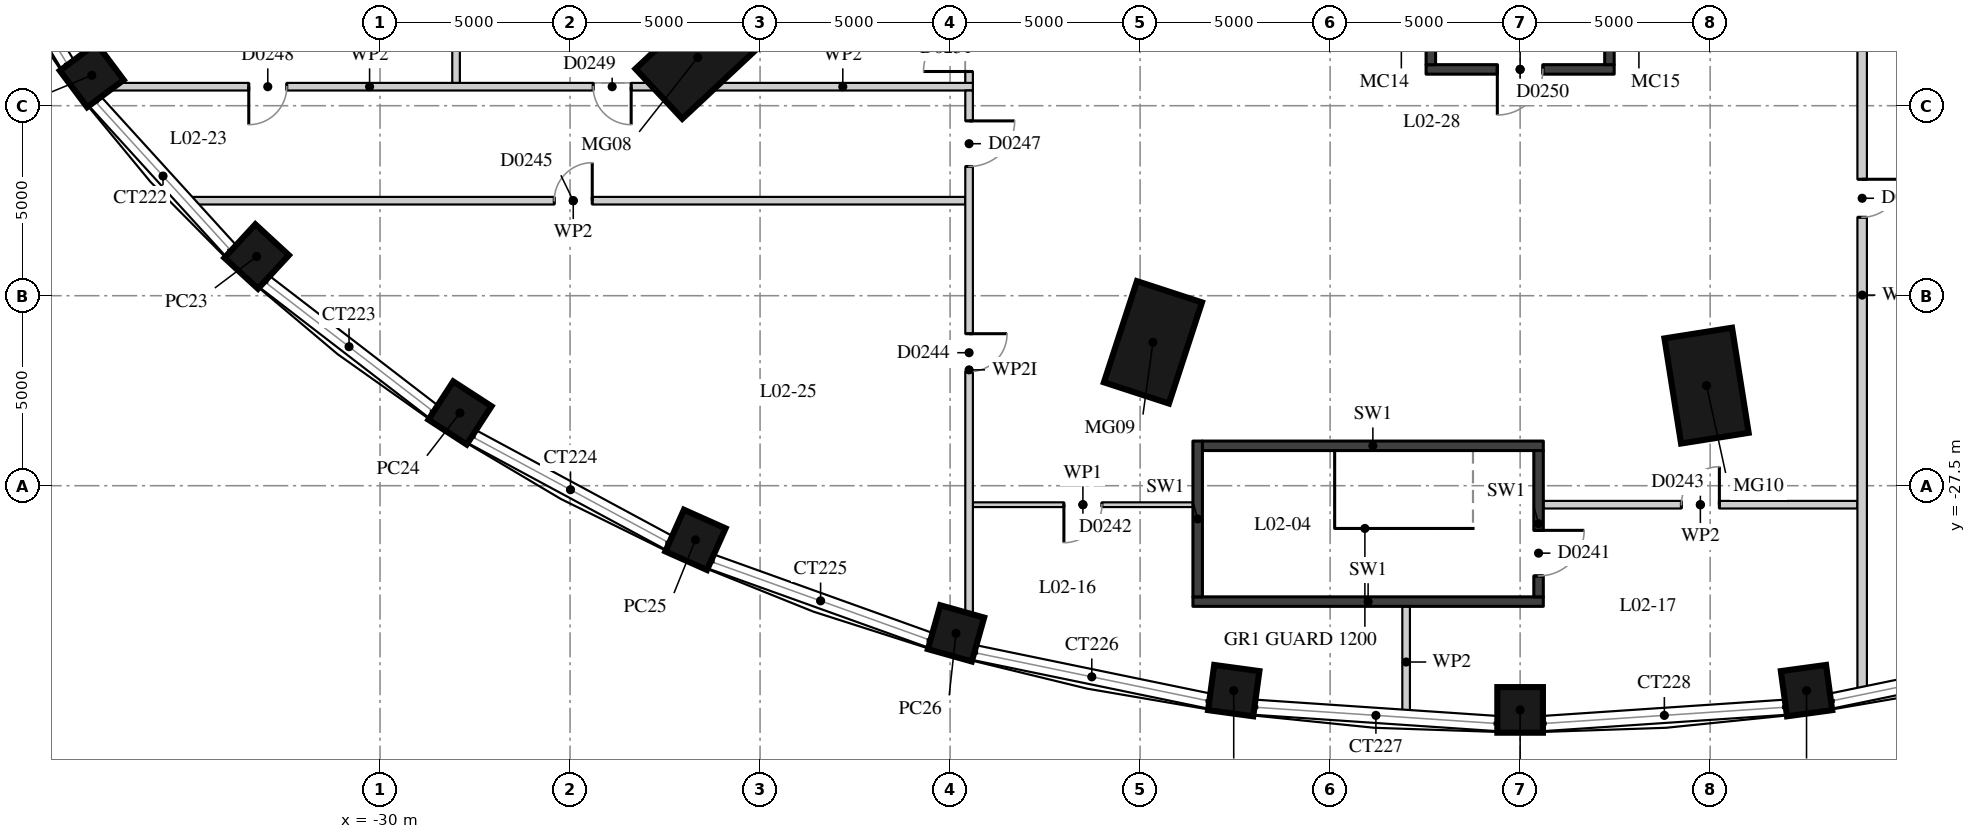
"""IFC4 building model, lengths in metres.
Left out: names, types, materials, properties, quantities, classifications, styles, units other than length and angle.
Written with IfcOpenShell. Run it as: python <this file> out.ifc"""

import sys

from ifc_helpers import new_model, si_unit, direction, frame, frame_2d, origin, origin_2d, place, context, subcontext, project, spatial, rectangle, extrude, element, fill, save


model = new_model("IFC4")
c1 = context("Model", 3, precision=1e-05, world=origin(), true_north=direction((0.0, 1.0)))
c2 = subcontext(c1, "Body", "Model", "MODEL_VIEW")
j1 = project(units=[si_unit("LENGTHUNIT", "METRE"), si_unit("PLANEANGLEUNIT", "RADIAN")], contexts=[c1])
p1 = place(None, origin())
s1 = spatial("IfcSite", under=j1, at=p1, CompositionType="ELEMENT")
p2 = place(p1, origin())
s2 = spatial("IfcBuilding", under=s1, at=p2, CompositionType="ELEMENT")
p3 = place(p2, frame((0.0, 0.0, 12.5)))
s3 = spatial("IfcBuildingStorey", under=s2, at=p3, CompositionType="ELEMENT", Elevation=12.5)
for number, where, z_axis, x_axis in (
    (1, (-21.641, -16.23, 0.0), (0.0, 0.0, 1.0), (-0.73, -0.683, 0.0)),
    (2, (-9.662, -23.727, 0.0), (0.0, 0.0, 1.0), (-0.31, -0.951, 0.0)),
    (3, (4.906, -24.866, 0.0), (0.0, 0.0, 1.0), (0.156, -0.988, 0.0)),
):
    element("IfcColumn", number, at=place(p3, frame(where, z_axis=z_axis, x_axis=x_axis)), inside=s3, PredefinedType="COLUMN", context=c2, shape_type="SweptSolid", body=[
        extrude(rectangle(XDim=2.8, YDim=1.8, at=origin_2d()), origin(), (0.0, 0.0, 1.0), 5.0),
    ])
for number, where, z_axis, x_axis in (
    (4, (-37.585, -16.7, 0.0), (0.0, 0.0, 1.0), (-0.801, -0.599, 0.0)),
    (5, (-33.246, -21.469, 0.0), (0.0, 0.0, 1.0), (-0.677, -0.736, 0.0)),
    (6, (-27.897, -25.586, 0.0), (0.0, 0.0, 1.0), (-0.544, -0.839, 0.0)),
    (7, (-21.7, -28.925, 0.0), (0.0, 0.0, 1.0), (-0.407, -0.913, 0.0)),
    (8, (-14.844, -31.386, 0.0), (0.0, 0.0, 1.0), (-0.271, -0.963, 0.0)),
    (9, (-7.536, -32.893, 0.0), (0.0, 0.0, 1.0), (-0.135, -0.991, 0.0)),
    (10, (0.0, -33.4, 0.0), (0.0, 0.0, 1.0), (0.0, -1.0, 0.0)),
    (11, (7.536, -32.893, 0.0), (0.0, 0.0, 1.0), (0.135, -0.991, 0.0)),
):
    element("IfcColumn", number, at=place(p3, frame(where, z_axis=z_axis, x_axis=x_axis)), inside=s3, PredefinedType="COLUMN", context=c2, shape_type="SweptSolid", body=[
        extrude(rectangle(XDim=1.2, YDim=1.2, at=origin_2d()), origin(), (0.0, 0.0, 1.0), 5.0),
    ])
p4 = place(p3, frame((-8.61, -30.55, 0.0), z_axis=(0.0, 0.0, 1.0), x_axis=(1.0, 0.0, 0.0)))
e12 = element("IfcWall", 12, at=p4, inside=s3, PredefinedType="SOLIDWALL", context=c2, shape_type="SweptSolid", body=[
    extrude(rectangle(XDim=9.22, YDim=0.25, at=frame_2d((4.61, 0.0))), origin(), (0.0, 0.0, 1.0), 4.65),
])
p5 = place(p3, frame((-14.4, -28.0, 0.0), z_axis=(0.0, 0.0, 1.0), x_axis=(1.0, 0.0, 0.0)))
e13 = element("IfcWall", 13, at=p5, inside=s3, PredefinedType="PARTITIONING", context=c2, shape_type="SweptSolid", body=[
    extrude(rectangle(XDim=5.79, YDim=0.125, at=frame_2d((2.895, 0.0))), origin(), (0.0, 0.0, 1.0), 4.65),
])
p6 = place(p5, frame((2.395, 0.0, 0.0)))
e14 = element("IfcOpeningElement", 14, at=p6, cuts=e13, PredefinedType="OPENING", context=c2, shape_type="SweptSolid", body=[
    extrude(rectangle(XDim=1.0, YDim=2.1, at=frame_2d((0.5, 1.05))), frame((0.0, 0.073, 0.0), z_axis=(0.0, -1.0, 0.0), x_axis=(1.0, 0.0, 0.0)), (0.0, 0.0, 1.0), 0.145),
])
p7 = place(p3, frame((0.61, -28.0, 0.0), z_axis=(0.0, 0.0, 1.0), x_axis=(1.0, 0.0, 0.0)))
e15 = element("IfcWall", 15, at=p7, inside=s3, PredefinedType="PARTITIONING", context=c2, shape_type="SweptSolid", body=[
    extrude(rectangle(XDim=8.265, YDim=0.2, at=frame_2d((4.132, 0.0))), origin(), (0.0, 0.0, 1.0), 4.65),
])
p8 = place(p7, frame((3.633, 0.0, 0.0)))
e16 = element("IfcOpeningElement", 16, at=p8, cuts=e15, PredefinedType="OPENING", context=c2, shape_type="SweptSolid", body=[
    extrude(rectangle(XDim=1.0, YDim=2.1, at=frame_2d((0.5, 1.05))), frame((0.0, 0.11, 0.0), z_axis=(0.0, -1.0, 0.0), x_axis=(1.0, 0.0, 0.0)), (0.0, 0.0, 1.0), 0.22),
])
p9 = place(p3, frame((-8.36, -26.45, 0.0), z_axis=(0.0, 0.0, 1.0), x_axis=(1.0, 0.0, 0.0)))
e17 = element("IfcWall", 17, at=p9, inside=s3, PredefinedType="SOLIDWALL", context=c2, shape_type="SweptSolid", body=[
    extrude(rectangle(XDim=8.97, YDim=0.25, at=frame_2d((4.485, 0.0))), origin(), (0.0, 0.0, 1.0), 4.65),
])
p10 = place(p3, frame((-35.231, -20.0, 0.0), z_axis=(0.0, 0.0, 1.0), x_axis=(1.0, 0.0, 0.0)))
e18 = element("IfcWall", 18, at=p10, inside=s3, PredefinedType="PARTITIONING", context=c2, shape_type="SweptSolid", body=[
    extrude(rectangle(XDim=20.631, YDim=0.2, at=frame_2d((10.316, 0.0))), origin(), (0.0, 0.0, 1.0), 4.65),
])
p11 = place(p10, frame((9.815, 0.0, 0.0)))
e19 = element("IfcOpeningElement", 19, at=p11, cuts=e18, PredefinedType="OPENING", context=c2, shape_type="SweptSolid", body=[
    extrude(rectangle(XDim=1.0, YDim=2.1, at=frame_2d((0.5, 1.05))), frame((0.0, 0.11, 0.0), z_axis=(0.0, -1.0, 0.0), x_axis=(1.0, 0.0, 0.0)), (0.0, 0.0, 1.0), 0.22),
])
p12 = place(p3, frame((-37.808, -17.0, 0.0), z_axis=(0.0, 0.0, 1.0), x_axis=(1.0, 0.0, 0.0)))
e20 = element("IfcWall", 20, at=p12, inside=s3, PredefinedType="PARTITIONING", context=c2, shape_type="SweptSolid", body=[
    extrude(rectangle(XDim=15.067, YDim=0.2, at=frame_2d((7.533, 0.0))), origin(), (0.0, 0.0, 1.0), 4.65),
])
p13 = place(p12, frame((4.354, 0.0, 0.0)))
e21 = element("IfcOpeningElement", 21, at=p13, cuts=e20, PredefinedType="OPENING", context=c2, shape_type="SweptSolid", body=[
    extrude(rectangle(XDim=1.0, YDim=2.1, at=frame_2d((0.5, 1.05))), frame((0.0, 0.11, 0.0), z_axis=(0.0, -1.0, 0.0), x_axis=(1.0, 0.0, 0.0)), (0.0, 0.0, 1.0), 0.22),
])
p14 = place(p12, frame((13.417, 0.0, 0.0)))
e22 = element("IfcOpeningElement", 22, at=p14, cuts=e20, PredefinedType="OPENING", context=c2, shape_type="SweptSolid", body=[
    extrude(rectangle(XDim=1.0, YDim=2.1, at=frame_2d((0.5, 1.05))), frame((0.0, 0.11, 0.0), z_axis=(0.0, -1.0, 0.0), x_axis=(1.0, 0.0, 0.0)), (0.0, 0.0, 1.0), 0.22),
])
p15 = place(p3, frame((-21.246, -17.0, 0.0), z_axis=(0.0, 0.0, 1.0), x_axis=(1.0, 0.0, 0.0)))
e23 = element("IfcWall", 23, at=p15, inside=s3, PredefinedType="PARTITIONING", context=c2, shape_type="SweptSolid", body=[
    extrude(rectangle(XDim=6.846, YDim=0.2, at=frame_2d((3.423, 0.0))), origin(), (0.0, 0.0, 1.0), 4.65),
])
p16 = place(p3, frame((-2.475, -16.545, 0.0), z_axis=(0.0, 0.0, 1.0), x_axis=(1.0, 0.0, 0.0)))
e24 = element("IfcWall", 24, at=p16, inside=s3, PredefinedType="SOLIDWALL", context=c2, shape_type="SweptSolid", body=[
    extrude(rectangle(XDim=4.95, YDim=0.25, at=frame_2d((2.475, 0.0))), origin(), (0.0, 0.0, 1.0), 4.65),
])
p17 = place(p16, frame((1.875, 0.0, 0.0)))
e25 = element("IfcOpeningElement", 25, at=p17, cuts=e24, PredefinedType="OPENING", context=c2, shape_type="SweptSolid", body=[
    extrude(rectangle(XDim=1.2, YDim=2.1, at=frame_2d((0.6, 1.05))), frame((0.0, 0.135, 0.0), z_axis=(0.0, -1.0, 0.0), x_axis=(1.0, 0.0, 0.0)), (0.0, 0.0, 1.0), 0.27),
])
p18 = place(p3, frame((-28.0, -16.9, 0.0), z_axis=(0.0, 0.0, 1.0), x_axis=(0.0, 1.0, 0.0)))
e26 = element("IfcWall", 26, at=p18, inside=s3, PredefinedType="PARTITIONING", context=c2, shape_type="SweptSolid", body=[
    extrude(rectangle(XDim=11.584, YDim=0.2, at=frame_2d((5.792, 0.0))), origin(), (0.0, 0.0, 1.0), 4.65),
])
p19 = place(p18, frame((8.0, 0.0, 0.0)))
e27 = element("IfcOpeningElement", 27, at=p19, cuts=e26, PredefinedType="OPENING", context=c2, shape_type="SweptSolid", body=[
    extrude(rectangle(XDim=1.8, YDim=2.1, at=frame_2d((0.9, 1.05))), frame((0.0, 0.11, 0.0), z_axis=(0.0, -1.0, 0.0), x_axis=(1.0, 0.0, 0.0)), (0.0, 0.0, 1.0), 0.22),
])
p20 = place(p3, frame((-14.5, -31.803, 0.0), z_axis=(0.0, 0.0, 1.0), x_axis=(0.0, 1.0, 0.0)))
e28 = element("IfcWall", 28, at=p20, inside=s3, PredefinedType="PARTITIONING", context=c2, shape_type="SweptSolid", body=[
    extrude(rectangle(XDim=14.703, YDim=0.2, at=frame_2d((7.352, 0.0))), origin(), (0.0, 0.0, 1.0), 4.2),
])
p21 = place(p20, frame((7.303, 0.0, 0.0)))
e29 = element("IfcOpeningElement", 29, at=p21, cuts=e28, PredefinedType="OPENING", context=c2, shape_type="SweptSolid", body=[
    extrude(rectangle(XDim=1.0, YDim=2.1, at=frame_2d((0.5, 1.05))), frame((0.0, 0.11, 0.0), z_axis=(0.0, -1.0, 0.0), x_axis=(1.0, 0.0, 0.0)), (0.0, 0.0, 1.0), 0.22),
])
p22 = place(p20, frame((12.703, 0.0, 0.0)))
e30 = element("IfcOpeningElement", 30, at=p22, cuts=e28, PredefinedType="OPENING", context=c2, shape_type="SweptSolid", body=[
    extrude(rectangle(XDim=1.2, YDim=2.1, at=frame_2d((0.6, 1.05))), frame((0.0, 0.11, 0.0), z_axis=(0.0, -1.0, 0.0), x_axis=(1.0, 0.0, 0.0)), (0.0, 0.0, 1.0), 0.22),
])
p23 = place(p3, frame((-14.5, -16.9, 0.0), z_axis=(0.0, 0.0, 1.0), x_axis=(0.0, 1.0, 0.0)))
e31 = element("IfcWall", 31, at=p23, inside=s3, PredefinedType="PARTITIONING", context=c2, shape_type="SweptSolid", body=[
    extrude(rectangle(XDim=3.0, YDim=0.2, at=frame_2d((1.5, 0.0))), origin(), (0.0, 0.0, 1.0), 4.2),
])
p24 = place(p23, frame((0.3, 0.0, 0.0)))
e32 = element("IfcOpeningElement", 32, at=p24, cuts=e31, PredefinedType="OPENING", context=c2, shape_type="SweptSolid", body=[
    extrude(rectangle(XDim=2.4, YDim=2.4, at=frame_2d((1.2, 1.2))), frame((0.0, 0.11, 0.0), z_axis=(0.0, -1.0, 0.0), x_axis=(1.0, 0.0, 0.0)), (0.0, 0.0, 1.0), 0.22),
])
p25 = place(p3, frame((-8.485, -30.425, 0.0), z_axis=(0.0, 0.0, 1.0), x_axis=(0.0, 1.0, 0.0)))
e33 = element("IfcWall", 33, at=p25, inside=s3, PredefinedType="SOLIDWALL", context=c2, shape_type="SweptSolid", body=[
    extrude(rectangle(XDim=4.1, YDim=0.25, at=frame_2d((2.05, 0.0))), origin(), (0.0, 0.0, 1.0), 4.65),
])
p26 = place(p3, frame((-3.0, -33.604, 0.0), z_axis=(0.0, 0.0, 1.0), x_axis=(0.0, 1.0, 0.0)))
e34 = element("IfcWall", 34, at=p26, inside=s3, PredefinedType="PARTITIONING", context=c2, shape_type="SweptSolid", body=[
    extrude(rectangle(XDim=2.929, YDim=0.2, at=frame_2d((1.465, 0.0))), origin(), (0.0, 0.0, 1.0), 4.65),
])
p27 = place(p3, frame((-2.35, -16.42, 0.0), z_axis=(0.0, 0.0, 1.0), x_axis=(0.0, 1.0, 0.0)))
e35 = element("IfcWall", 35, at=p27, inside=s3, PredefinedType="SOLIDWALL", context=c2, shape_type="SweptSolid", body=[
    extrude(rectangle(XDim=9.87, YDim=0.25, at=frame_2d((4.935, 0.0))), origin(), (0.0, 0.0, 1.0), 4.65),
])
p28 = place(p3, frame((0.485, -30.425, 0.0), z_axis=(0.0, 0.0, 1.0), x_axis=(0.0, 1.0, 0.0)))
e36 = element("IfcWall", 36, at=p28, inside=s3, PredefinedType="SOLIDWALL", context=c2, shape_type="SweptSolid", body=[
    extrude(rectangle(XDim=3.85, YDim=0.25, at=frame_2d((1.925, 0.0))), origin(), (0.0, 0.0, 1.0), 4.65),
])
p29 = place(p28, frame((0.55, 0.0, 0.0)))
e37 = element("IfcOpeningElement", 37, at=p29, cuts=e36, PredefinedType="OPENING", context=c2, shape_type="SweptSolid", body=[
    extrude(rectangle(XDim=1.2, YDim=2.1, at=frame_2d((0.6, 1.05))), frame((0.0, 0.135, 0.0), z_axis=(0.0, -1.0, 0.0), x_axis=(1.0, 0.0, 0.0)), (0.0, 0.0, 1.0), 0.27),
])
p30 = place(p3, frame((2.35, -16.42, 0.0), z_axis=(0.0, 0.0, 1.0), x_axis=(0.0, 1.0, 0.0)))
e38 = element("IfcWall", 38, at=p30, inside=s3, PredefinedType="SOLIDWALL", context=c2, shape_type="SweptSolid", body=[
    extrude(rectangle(XDim=9.02, YDim=0.25, at=frame_2d((4.51, 0.0))), origin(), (0.0, 0.0, 1.0), 4.65),
])
p31 = place(p3, frame((9.0, -32.97, 0.0), z_axis=(0.0, 0.0, 1.0), x_axis=(0.0, 1.0, 0.0)))
e39 = element("IfcWall", 39, at=p31, inside=s3, PredefinedType="PARTITIONING", context=c2, shape_type="SweptSolid", body=[
    extrude(rectangle(XDim=20.972, YDim=0.25, at=frame_2d((10.486, 0.0))), origin(), (0.0, 0.0, 1.0), 4.1),
])
p32 = place(p31, frame((12.534, 0.0, 0.0)))
e40 = element("IfcOpeningElement", 40, at=p32, cuts=e39, PredefinedType="OPENING", context=c2, shape_type="SweptSolid", body=[
    extrude(rectangle(XDim=1.0, YDim=2.1, at=frame_2d((0.5, 1.05))), frame((0.0, 0.135, 0.0), z_axis=(0.0, -1.0, 0.0), x_axis=(1.0, 0.0, 0.0)), (0.0, 0.0, 1.0), 0.27),
])
p33 = place(p24, origin())
e41 = element("IfcDoor", 41, at=p33, inside=s3, OperationType="DOUBLE_DOOR_SINGLE_SWING", PredefinedType="DOOR", context=c2, shape_type="SweptSolid", body=[
    extrude(rectangle(XDim=2.4, YDim=2.4, at=frame_2d((1.2, 1.2))), frame((0.0, 0.025, 0.0), z_axis=(0.0, -1.0, 0.0), x_axis=(1.0, 0.0, 0.0)), (0.0, 0.0, 1.0), 0.05),
])
fill(e32, e41)
p34 = place(p13, origin())
e42 = element("IfcDoor", 42, at=p34, inside=s3, OperationType="SINGLE_SWING_RIGHT", PredefinedType="DOOR", context=c2, shape_type="SweptSolid", body=[
    extrude(rectangle(XDim=1.0, YDim=2.1, at=frame_2d((0.5, 1.05))), frame((0.0, 0.025, 0.0), z_axis=(0.0, -1.0, 0.0), x_axis=(1.0, 0.0, 0.0)), (0.0, 0.0, 1.0), 0.05),
])
fill(e21, e42)
p35 = place(p14, origin())
e43 = element("IfcDoor", 43, at=p35, inside=s3, OperationType="SINGLE_SWING_LEFT", PredefinedType="DOOR", context=c2, shape_type="SweptSolid", body=[
    extrude(rectangle(XDim=1.0, YDim=2.1, at=frame_2d((0.5, 1.05))), frame((0.0, 0.025, 0.0), z_axis=(0.0, -1.0, 0.0), x_axis=(1.0, 0.0, 0.0)), (0.0, 0.0, 1.0), 0.05),
])
fill(e22, e43)
p36 = place(p11, origin())
e44 = element("IfcDoor", 44, at=p36, inside=s3, OperationType="SINGLE_SWING_RIGHT", PredefinedType="DOOR", context=c2, shape_type="SweptSolid", body=[
    extrude(rectangle(XDim=1.0, YDim=2.1, at=frame_2d((0.5, 1.05))), frame((0.0, 0.025, 0.0), z_axis=(0.0, -1.0, 0.0), x_axis=(1.0, 0.0, 0.0)), (0.0, 0.0, 1.0), 0.05),
])
fill(e19, e44)
p37 = place(p21, origin())
e45 = element("IfcDoor", 45, at=p37, inside=s3, OperationType="SINGLE_SWING_LEFT", PredefinedType="DOOR", context=c2, shape_type="SweptSolid", body=[
    extrude(rectangle(XDim=1.0, YDim=2.1, at=frame_2d((0.5, 1.05))), frame((0.0, 0.025, 0.0), z_axis=(0.0, -1.0, 0.0), x_axis=(1.0, 0.0, 0.0)), (0.0, 0.0, 1.0), 0.05),
])
fill(e29, e45)
p38 = place(p22, origin())
e46 = element("IfcDoor", 46, at=p38, inside=s3, OperationType="SINGLE_SWING_LEFT", PredefinedType="DOOR", context=c2, shape_type="SweptSolid", body=[
    extrude(rectangle(XDim=1.2, YDim=2.1, at=frame_2d((0.6, 1.05))), frame((0.0, 0.025, 0.0), z_axis=(0.0, -1.0, 0.0), x_axis=(1.0, 0.0, 0.0)), (0.0, 0.0, 1.0), 0.05),
])
fill(e30, e46)
p39 = place(p32, origin())
e47 = element("IfcDoor", 47, at=p39, inside=s3, OperationType="SINGLE_SWING_LEFT", PredefinedType="DOOR", context=c2, shape_type="SweptSolid", body=[
    extrude(rectangle(XDim=1.0, YDim=2.1, at=frame_2d((0.5, 1.05))), frame((0.0, 0.025, 0.0), z_axis=(0.0, -1.0, 0.0), x_axis=(1.0, 0.0, 0.0)), (0.0, 0.0, 1.0), 0.05),
])
fill(e40, e47)
p40 = place(p6, origin())
e48 = element("IfcDoor", 48, at=p40, inside=s3, OperationType="SINGLE_SWING_RIGHT", PredefinedType="DOOR", context=c2, shape_type="SweptSolid", body=[
    extrude(rectangle(XDim=1.0, YDim=2.1, at=frame_2d((0.5, 1.05))), frame((0.0, 0.025, 0.0), z_axis=(0.0, -1.0, 0.0), x_axis=(1.0, 0.0, 0.0)), (0.0, 0.0, 1.0), 0.05),
])
fill(e14, e48)
p41 = place(p8, origin())
e49 = element("IfcDoor", 49, at=p41, inside=s3, OperationType="SINGLE_SWING_RIGHT", PredefinedType="DOOR", context=c2, shape_type="SweptSolid", body=[
    extrude(rectangle(XDim=1.0, YDim=2.1, at=frame_2d((0.5, 1.05))), frame((0.0, 0.025, 0.0), z_axis=(0.0, -1.0, 0.0), x_axis=(1.0, 0.0, 0.0)), (0.0, 0.0, 1.0), 0.05),
])
fill(e16, e49)
p42 = place(p17, origin())
e50 = element("IfcDoor", 50, at=p42, inside=s3, OperationType="SINGLE_SWING_RIGHT", PredefinedType="DOOR", context=c2, shape_type="SweptSolid", body=[
    extrude(rectangle(XDim=1.2, YDim=2.1, at=frame_2d((0.6, 1.05))), frame((0.0, 0.025, 0.0), z_axis=(0.0, -1.0, 0.0), x_axis=(1.0, 0.0, 0.0)), (0.0, 0.0, 1.0), 0.05),
])
fill(e25, e50)
p43 = place(p29, origin())
e51 = element("IfcDoor", 51, at=p43, inside=s3, OperationType="SINGLE_SWING_LEFT", PredefinedType="DOOR", context=c2, shape_type="SweptSolid", body=[
    extrude(rectangle(XDim=1.2, YDim=2.1, at=frame_2d((0.6, 1.05))), frame((0.0, 0.025, 0.0), z_axis=(0.0, -1.0, 0.0), x_axis=(1.0, 0.0, 0.0)), (0.0, 0.0, 1.0), 0.05),
])
fill(e37, e51)
save(model, sys.argv[1])
